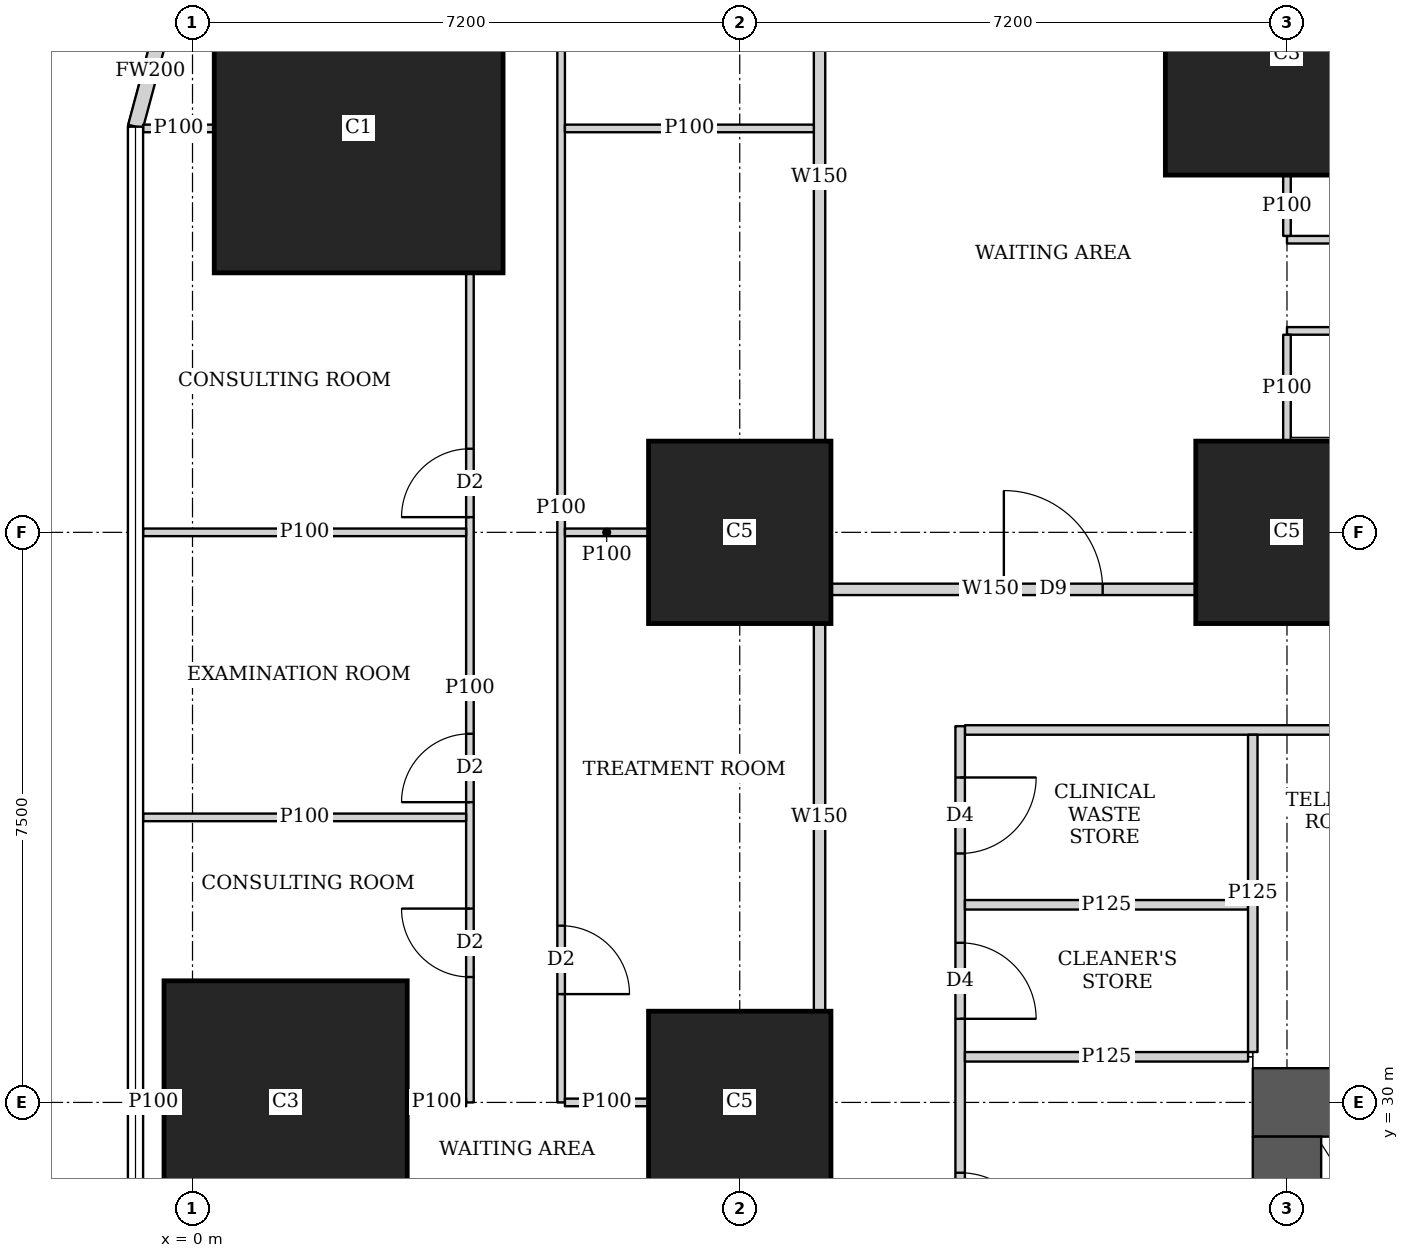
"""IFC4 building model, lengths in metres.
Left out: names, types, materials, properties, quantities, classifications, styles, units other than length and angle.
Written with IfcOpenShell. Run it as: python <this file> out.ifc"""

import sys

from ifc_helpers import new_model, si_unit, direction, frame, frame_2d, origin, origin_2d, place, context, subcontext, project, spatial, rectangle, extrude, element, fill, save


model = new_model("IFC4")
c1 = context("Model", 3, precision=1e-05, world=origin(), true_north=direction((0.0, 1.0)))
c2 = subcontext(c1, "Body", "Model", "MODEL_VIEW")
j1 = project(units=[si_unit("LENGTHUNIT", "METRE"), si_unit("PLANEANGLEUNIT", "RADIAN")], contexts=[c1])
p1 = place(None, origin())
s1 = spatial("IfcSite", under=j1, at=p1, CompositionType="ELEMENT")
p2 = place(p1, origin())
s2 = spatial("IfcBuilding", under=s1, at=p2, CompositionType="ELEMENT")
p3 = place(p2, frame((0.0, 0.0, 5.6)))
s3 = spatial("IfcBuildingStorey", under=s2, at=p3, CompositionType="ELEMENT", Elevation=5.6)
p4 = place(p3, frame((1.225, 30.0, 0.0), z_axis=(0.0, 0.0, 1.0), x_axis=(1.0, 0.0, 0.0)))
e1 = element("IfcColumn", 1, at=p4, inside=s3, PredefinedType="COLUMN", context=c2, shape_type="SweptSolid", body=[
    extrude(rectangle(XDim=3.2, YDim=3.2, at=origin_2d()), origin(), (0.0, 0.0, 1.0), 4.5),
])
for number, where, z_axis, x_axis in (
    (2, (7.2, 30.0, 0.0), (0.0, 0.0, 1.0), (1.0, 0.0, 0.0)),
    (3, (7.2, 37.5, 0.0), (0.0, 0.0, 1.0), (1.0, 0.0, 0.0)),
    (4, (14.4, 37.5, 0.0), (0.0, 0.0, 1.0), (1.0, 0.0, 0.0)),
):
    element("IfcColumn", number, at=place(p3, frame(where, z_axis=z_axis, x_axis=x_axis)), inside=s3, PredefinedType="COLUMN", context=c2, shape_type="SweptSolid", body=[
        extrude(rectangle(XDim=2.4, YDim=2.4, at=origin_2d()), origin(), (0.0, 0.0, 1.0), 4.5),
    ])
p5 = place(p3, frame((2.186, 42.814, 0.0), z_axis=(0.0, 0.0, 1.0), x_axis=(1.0, 0.0, 0.0)))
e5 = element("IfcColumn", 5, at=p5, inside=s3, PredefinedType="COLUMN", context=c2, shape_type="SweptSolid", body=[
    extrude(rectangle(XDim=3.8, YDim=3.8, at=origin_2d()), origin(), (0.0, 0.0, 1.0), 4.5),
])
p6 = place(p3, frame((14.4, 43.8, 0.0), z_axis=(0.0, 0.0, 1.0), x_axis=(1.0, 0.0, 0.0)))
e6 = element("IfcColumn", 6, at=p6, inside=s3, PredefinedType="COLUMN", context=c2, shape_type="SweptSolid", body=[
    extrude(rectangle(XDim=3.2, YDim=3.2, at=origin_2d()), origin(), (0.0, 0.0, 1.0), 4.5),
])
p7 = place(p3, frame((13.95, 30.0, 0.0), z_axis=(0.0, 0.0, 1.0), x_axis=(1.0, 0.0, 0.0)))
e7 = element("IfcWall", 7, at=p7, inside=s3, PredefinedType="SHEAR", context=c2, shape_type="SweptSolid", body=[
    extrude(rectangle(XDim=15.3, YDim=0.9, at=frame_2d((7.65, 0.0))), origin(), (0.0, 0.0, 1.0), 4.5),
])
p8 = place(p7, frame((4.45, 0.0, 0.0)))
e8 = element("IfcOpeningElement", 8, at=p8, cuts=e7, PredefinedType="OPENING", context=c2, shape_type="SweptSolid", body=[
    extrude(rectangle(XDim=1.8, YDim=2.1, at=frame_2d((0.9, 1.05))), frame((0.0, 0.46, 0.0), z_axis=(0.0, -1.0, 0.0), x_axis=(1.0, 0.0, 0.0)), (0.0, 0.0, 1.0), 0.92),
])
p9 = place(p7, frame((10.7, 0.0, 0.0)))
e9 = element("IfcOpeningElement", 9, at=p9, cuts=e7, PredefinedType="OPENING", context=c2, shape_type="SweptSolid", body=[
    extrude(rectangle(XDim=1.1, YDim=2.1, at=frame_2d((0.55, 1.05))), frame((0.0, 0.46, 0.0), z_axis=(0.0, -1.0, 0.0), x_axis=(1.0, 0.0, 0.0)), (0.0, 0.0, 1.0), 0.92),
])
p10 = place(p3, frame((14.4, 15.45, 0.0), z_axis=(0.0, 0.0, 1.0), x_axis=(0.0, 1.0, 0.0)))
e10 = element("IfcWall", 10, at=p10, inside=s3, PredefinedType="SHEAR", context=c2, shape_type="SweptSolid", body=[
    extrude(rectangle(XDim=14.1, YDim=0.9, at=frame_2d((7.05, 0.0))), origin(), (0.0, 0.0, 1.0), 4.5),
])
p11 = place(p3, frame((-0.358, 44.298, 0.0), z_axis=(0.0, 0.0, 1.0), x_axis=(-0.259168954497, -0.965832000415, 0.0)))
e11 = element("IfcWall", 11, at=p11, inside=s3, PredefinedType="SOLIDWALL", context=c2, shape_type="SweptSolid", body=[
    extrude(rectangle(XDim=1.513, YDim=0.2, at=frame_2d((0.756, 0.0))), origin(), (0.0, 0.0, 1.0), 4.2),
])
p12 = place(p3, frame((8.25, 31.201, 0.0), z_axis=(0.0, 0.0, 1.0), x_axis=(0.0, 1.0, 0.0)))
e12 = element("IfcWall", 12, at=p12, inside=s3, PredefinedType="SOLIDWALL", context=c2, shape_type="SweptSolid", body=[
    extrude(rectangle(XDim=5.098, YDim=0.15, at=frame_2d((2.549, 0.0))), origin(), (0.0, 0.0, 1.0), 4.2),
])
p13 = place(p3, frame((8.25, 38.701, 0.0), z_axis=(0.0, 0.0, 1.0), x_axis=(0.0, 1.0, 0.0)))
e13 = element("IfcWall", 13, at=p13, inside=s3, PredefinedType="SOLIDWALL", context=c2, shape_type="SweptSolid", body=[
    extrude(rectangle(XDim=6.949, YDim=0.15, at=frame_2d((3.475, 0.0))), origin(), (0.0, 0.0, 1.0), 2.4),
])
p14 = place(p3, frame((8.401, 36.75, 0.0), z_axis=(0.0, 0.0, 1.0), x_axis=(1.0, 0.0, 0.0)))
e14 = element("IfcWall", 14, at=p14, inside=s3, PredefinedType="SOLIDWALL", context=c2, shape_type="SweptSolid", body=[
    extrude(rectangle(XDim=4.798, YDim=0.15, at=frame_2d((2.399, 0.0))), origin(), (0.0, 0.0, 1.0), 2.6),
])
p15 = place(p14, frame((2.274, 0.0, 0.0)))
e15 = element("IfcOpeningElement", 15, at=p15, cuts=e14, PredefinedType="OPENING", context=c2, shape_type="SweptSolid", body=[
    extrude(rectangle(XDim=1.3, YDim=2.1, at=frame_2d((0.65, 1.05))), frame((0.0, 0.085, 0.0), z_axis=(0.0, -1.0, 0.0), x_axis=(1.0, 0.0, 0.0)), (0.0, 0.0, 1.0), 0.17),
])
p16 = place(p3, frame((3.65, 30.0, 0.0), z_axis=(0.0, 0.0, 1.0), x_axis=(0.0, 1.0, 0.0)))
e16 = element("IfcWall", 16, at=p16, inside=s3, PredefinedType="PARTITIONING", context=c2, shape_type="SweptSolid", body=[
    extrude(rectangle(XDim=10.913, YDim=0.1, at=frame_2d((5.457, 0.0))), origin(), (0.0, 0.0, 1.0), 2.6),
])
p17 = place(p16, frame((1.65, 0.0, 0.0)))
e17 = element("IfcOpeningElement", 17, at=p17, cuts=e16, PredefinedType="OPENING", context=c2, shape_type="SweptSolid", body=[
    extrude(rectangle(XDim=0.9, YDim=2.1, at=frame_2d((0.45, 1.05))), frame((0.0, 0.06, 0.0), z_axis=(0.0, -1.0, 0.0), x_axis=(1.0, 0.0, 0.0)), (0.0, 0.0, 1.0), 0.12),
])
p18 = place(p16, frame((3.95, 0.0, 0.0)))
e18 = element("IfcOpeningElement", 18, at=p18, cuts=e16, PredefinedType="OPENING", context=c2, shape_type="SweptSolid", body=[
    extrude(rectangle(XDim=0.9, YDim=2.1, at=frame_2d((0.45, 1.05))), frame((0.0, 0.06, 0.0), z_axis=(0.0, -1.0, 0.0), x_axis=(1.0, 0.0, 0.0)), (0.0, 0.0, 1.0), 0.12),
])
p19 = place(p16, frame((7.7, 0.0, 0.0)))
e19 = element("IfcOpeningElement", 19, at=p19, cuts=e16, PredefinedType="OPENING", context=c2, shape_type="SweptSolid", body=[
    extrude(rectangle(XDim=0.9, YDim=2.1, at=frame_2d((0.45, 1.05))), frame((0.0, 0.06, 0.0), z_axis=(0.0, -1.0, 0.0), x_axis=(1.0, 0.0, 0.0)), (0.0, 0.0, 1.0), 0.12),
])
p20 = place(p3, frame((4.85, 30.0, 0.0), z_axis=(0.0, 0.0, 1.0), x_axis=(0.0, 1.0, 0.0)))
e20 = element("IfcWall", 20, at=p20, inside=s3, PredefinedType="PARTITIONING", context=c2, shape_type="SweptSolid", body=[
    extrude(rectangle(XDim=15.65, YDim=0.1, at=frame_2d((7.825, 0.0))), origin(), (0.0, 0.0, 1.0), 2.4),
])
p21 = place(p20, frame((1.425, 0.0, 0.0)))
e21 = element("IfcOpeningElement", 21, at=p21, cuts=e20, PredefinedType="OPENING", context=c2, shape_type="SweptSolid", body=[
    extrude(rectangle(XDim=0.9, YDim=2.1, at=frame_2d((0.45, 1.05))), frame((0.0, 0.06, 0.0), z_axis=(0.0, -1.0, 0.0), x_axis=(1.0, 0.0, 0.0)), (0.0, 0.0, 1.0), 0.12),
])
p22 = place(p3, frame((-0.65, 30.0, 0.0), z_axis=(0.0, 0.0, 1.0), x_axis=(1.0, 0.0, 0.0)))
e22 = element("IfcWall", 22, at=p22, inside=s3, PredefinedType="PARTITIONING", context=c2, shape_type="SweptSolid", body=[
    extrude(rectangle(XDim=0.274, YDim=0.1, at=frame_2d((0.137, 0.0))), origin(), (0.0, 0.0, 1.0), 4.2),
])
p23 = place(p3, frame((2.826, 30.0, 0.0), z_axis=(0.0, 0.0, 1.0), x_axis=(1.0, 0.0, 0.0)))
e23 = element("IfcWall", 23, at=p23, inside=s3, PredefinedType="PARTITIONING", context=c2, shape_type="SweptSolid", body=[
    extrude(rectangle(XDim=0.774, YDim=0.1, at=frame_2d((0.387, 0.0))), origin(), (0.0, 0.0, 1.0), 2.6),
])
for number, where, z_axis, x_axis in (
    (24, (-0.65, 33.75, 0.0), (0.0, 0.0, 1.0), (1.0, 0.0, 0.0)),
    (25, (-0.65, 37.5, 0.0), (0.0, 0.0, 1.0), (1.0, 0.0, 0.0)),
):
    element("IfcWall", number, at=place(p3, frame(where, z_axis=z_axis, x_axis=x_axis)), inside=s3, PredefinedType="PARTITIONING", context=c2, shape_type="SweptSolid", body=[
        extrude(rectangle(XDim=4.25, YDim=0.1, at=frame_2d((2.125, 0.0))), origin(), (0.0, 0.0, 1.0), 2.4),
    ])
p24 = place(p3, frame((-0.65, 42.814, 0.0), z_axis=(0.0, 0.0, 1.0), x_axis=(1.0, 0.0, 0.0)))
e26 = element("IfcWall", 26, at=p24, inside=s3, PredefinedType="PARTITIONING", context=c2, shape_type="SweptSolid", body=[
    extrude(rectangle(XDim=0.935, YDim=0.1, at=frame_2d((0.467, 0.0))), origin(), (0.0, 0.0, 1.0), 4.2),
])
p25 = place(p3, frame((4.9, 30.0, 0.0), z_axis=(0.0, 0.0, 1.0), x_axis=(1.0, 0.0, 0.0)))
e27 = element("IfcWall", 27, at=p25, inside=s3, PredefinedType="PARTITIONING", context=c2, shape_type="SweptSolid", body=[
    extrude(rectangle(XDim=1.099, YDim=0.1, at=frame_2d((0.55, 0.0))), origin(), (0.0, 0.0, 1.0), 2.6),
])
p26 = place(p3, frame((4.9, 37.5, 0.0), z_axis=(0.0, 0.0, 1.0), x_axis=(1.0, 0.0, 0.0)))
e28 = element("IfcWall", 28, at=p26, inside=s3, PredefinedType="PARTITIONING", context=c2, shape_type="SweptSolid", body=[
    extrude(rectangle(XDim=1.099, YDim=0.1, at=frame_2d((0.55, 0.0))), origin(), (0.0, 0.0, 1.0), 4.2),
])
p27 = place(p3, frame((4.9, 42.814, 0.0), z_axis=(0.0, 0.0, 1.0), x_axis=(1.0, 0.0, 0.0)))
e29 = element("IfcWall", 29, at=p27, inside=s3, PredefinedType="PARTITIONING", context=c2, shape_type="SweptSolid", body=[
    extrude(rectangle(XDim=3.275, YDim=0.1, at=frame_2d((1.638, 0.0))), origin(), (0.0, 0.0, 1.0), 2.4),
])
p28 = place(p3, frame((14.4, 41.35, 0.0), z_axis=(0.0, 0.0, 1.0), x_axis=(1.0, 0.0, 0.0)))
e30 = element("IfcWall", 30, at=p28, inside=s3, PredefinedType="PARTITIONING", context=c2, shape_type="SweptSolid", body=[
    extrude(rectangle(XDim=3.475, YDim=0.1, at=frame_2d((1.738, 0.0))), origin(), (0.0, 0.0, 1.0), 2.6),
])
p29 = place(p28, frame((1.65, 0.0, 0.0)))
e31 = element("IfcOpeningElement", 31, at=p29, cuts=e30, PredefinedType="OPENING", context=c2, shape_type="SweptSolid", body=[
    extrude(rectangle(XDim=0.9, YDim=2.1, at=frame_2d((0.45, 1.05))), frame((0.0, 0.06, 0.0), z_axis=(0.0, -1.0, 0.0), x_axis=(1.0, 0.0, 0.0)), (0.0, 0.0, 1.0), 0.12),
])
p30 = place(p3, frame((14.4, 40.15, 0.0), z_axis=(0.0, 0.0, 1.0), x_axis=(1.0, 0.0, 0.0)))
e32 = element("IfcWall", 32, at=p30, inside=s3, PredefinedType="PARTITIONING", context=c2, shape_type="SweptSolid", body=[
    extrude(rectangle(XDim=3.475, YDim=0.1, at=frame_2d((1.738, 0.0))), origin(), (0.0, 0.0, 1.0), 2.6),
])
p31 = place(p30, frame((1.35, 0.0, 0.0)))
e33 = element("IfcOpeningElement", 33, at=p31, cuts=e32, PredefinedType="OPENING", context=c2, shape_type="SweptSolid", body=[
    extrude(rectangle(XDim=0.9, YDim=2.1, at=frame_2d((0.45, 1.05))), frame((0.0, 0.06, 0.0), z_axis=(0.0, -1.0, 0.0), x_axis=(1.0, 0.0, 0.0)), (0.0, 0.0, 1.0), 0.12),
])
p32 = place(p3, frame((14.4, 41.4, 0.0), z_axis=(0.0, 0.0, 1.0), x_axis=(0.0, 1.0, 0.0)))
e34 = element("IfcWall", 34, at=p32, inside=s3, PredefinedType="PARTITIONING", context=c2, shape_type="SweptSolid", body=[
    extrude(rectangle(XDim=0.799, YDim=0.1, at=frame_2d((0.399, 0.0))), origin(), (0.0, 0.0, 1.0), 2.6),
])
p33 = place(p3, frame((14.4, 38.701, 0.0), z_axis=(0.0, 0.0, 1.0), x_axis=(0.0, 1.0, 0.0)))
e35 = element("IfcWall", 35, at=p33, inside=s3, PredefinedType="PARTITIONING", context=c2, shape_type="SweptSolid", body=[
    extrude(rectangle(XDim=1.399, YDim=0.1, at=frame_2d((0.7, 0.0))), origin(), (0.0, 0.0, 1.0), 2.6),
])
p34 = place(p3, frame((10.1, 10.05, 0.0), z_axis=(0.0, 0.0, 1.0), x_axis=(0.0, 1.0, 0.0)))
e36 = element("IfcWall", 36, at=p34, inside=s3, PredefinedType="PARTITIONING", context=c2, shape_type="SweptSolid", body=[
    extrude(rectangle(XDim=24.9, YDim=0.125, at=frame_2d((12.45, 0.0))), origin(), (0.0, 0.0, 1.0), 2.6),
])
p35 = place(p34, frame((1.675, 0.0, 0.0)))
e37 = element("IfcOpeningElement", 37, at=p35, cuts=e36, PredefinedType="OPENING", context=c2, shape_type="SweptSolid", body=[
    extrude(rectangle(XDim=1.0, YDim=2.1, at=frame_2d((0.5, 1.05))), frame((0.0, 0.073, 0.0), z_axis=(0.0, -1.0, 0.0), x_axis=(1.0, 0.0, 0.0)), (0.0, 0.0, 1.0), 0.145),
])
p36 = place(p34, frame((5.85, 0.0, 0.0)))
e38 = element("IfcOpeningElement", 38, at=p36, cuts=e36, PredefinedType="OPENING", context=c2, shape_type="SweptSolid", body=[
    extrude(rectangle(XDim=1.0, YDim=2.1, at=frame_2d((0.5, 1.05))), frame((0.0, 0.073, 0.0), z_axis=(0.0, -1.0, 0.0), x_axis=(1.0, 0.0, 0.0)), (0.0, 0.0, 1.0), 0.145),
])
p37 = place(p34, frame((8.975, 0.0, 0.0)))
e39 = element("IfcOpeningElement", 39, at=p37, cuts=e36, PredefinedType="OPENING", context=c2, shape_type="SweptSolid", body=[
    extrude(rectangle(XDim=1.0, YDim=2.1, at=frame_2d((0.5, 1.05))), frame((0.0, 0.073, 0.0), z_axis=(0.0, -1.0, 0.0), x_axis=(1.0, 0.0, 0.0)), (0.0, 0.0, 1.0), 0.145),
])
p38 = place(p34, frame((11.025, 0.0, 0.0)))
e40 = element("IfcOpeningElement", 40, at=p38, cuts=e36, PredefinedType="OPENING", context=c2, shape_type="SweptSolid", body=[
    extrude(rectangle(XDim=1.0, YDim=2.1, at=frame_2d((0.5, 1.05))), frame((0.0, 0.073, 0.0), z_axis=(0.0, -1.0, 0.0), x_axis=(1.0, 0.0, 0.0)), (0.0, 0.0, 1.0), 0.145),
])
p39 = place(p34, frame((13.975, 0.0, 0.0)))
e41 = element("IfcOpeningElement", 41, at=p39, cuts=e36, PredefinedType="OPENING", context=c2, shape_type="SweptSolid", body=[
    extrude(rectangle(XDim=1.0, YDim=2.1, at=frame_2d((0.5, 1.05))), frame((0.0, 0.073, 0.0), z_axis=(0.0, -1.0, 0.0), x_axis=(1.0, 0.0, 0.0)), (0.0, 0.0, 1.0), 0.145),
])
p40 = place(p34, frame((18.025, 0.0, 0.0)))
e42 = element("IfcOpeningElement", 42, at=p40, cuts=e36, PredefinedType="OPENING", context=c2, shape_type="SweptSolid", body=[
    extrude(rectangle(XDim=1.0, YDim=2.1, at=frame_2d((0.5, 1.05))), frame((0.0, 0.073, 0.0), z_axis=(0.0, -1.0, 0.0), x_axis=(1.0, 0.0, 0.0)), (0.0, 0.0, 1.0), 0.145),
])
p41 = place(p34, frame((21.05, 0.0, 0.0)))
e43 = element("IfcOpeningElement", 43, at=p41, cuts=e36, PredefinedType="OPENING", context=c2, shape_type="SweptSolid", body=[
    extrude(rectangle(XDim=1.0, YDim=2.1, at=frame_2d((0.5, 1.05))), frame((0.0, 0.073, 0.0), z_axis=(0.0, -1.0, 0.0), x_axis=(1.0, 0.0, 0.0)), (0.0, 0.0, 1.0), 0.145),
])
p42 = place(p34, frame((23.225, 0.0, 0.0)))
e44 = element("IfcOpeningElement", 44, at=p42, cuts=e36, PredefinedType="OPENING", context=c2, shape_type="SweptSolid", body=[
    extrude(rectangle(XDim=1.0, YDim=2.1, at=frame_2d((0.5, 1.05))), frame((0.0, 0.073, 0.0), z_axis=(0.0, -1.0, 0.0), x_axis=(1.0, 0.0, 0.0)), (0.0, 0.0, 1.0), 0.145),
])
p43 = place(p3, frame((10.163, 30.6, 0.0), z_axis=(0.0, 0.0, 1.0), x_axis=(1.0, 0.0, 0.0)))
e45 = element("IfcWall", 45, at=p43, inside=s3, PredefinedType="PARTITIONING", context=c2, shape_type="SweptSolid", body=[
    extrude(rectangle(XDim=3.725, YDim=0.125, at=frame_2d((1.862, 0.0))), origin(), (0.0, 0.0, 1.0), 2.6),
])
p44 = place(p3, frame((13.95, 30.663, 0.0), z_axis=(0.0, 0.0, 1.0), x_axis=(0.0, 1.0, 0.0)))
e46 = element("IfcWall", 46, at=p44, inside=s3, PredefinedType="PARTITIONING", context=c2, shape_type="SweptSolid", body=[
    extrude(rectangle(XDim=4.174, YDim=0.125, at=frame_2d((2.087, 0.0))), origin(), (0.0, 0.0, 1.0), 2.6),
])
p45 = place(p3, frame((10.163, 34.9, 0.0), z_axis=(0.0, 0.0, 1.0), x_axis=(1.0, 0.0, 0.0)))
e47 = element("IfcWall", 47, at=p45, inside=s3, PredefinedType="PARTITIONING", context=c2, shape_type="SweptSolid", body=[
    extrude(rectangle(XDim=11.287, YDim=0.125, at=frame_2d((5.644, 0.0))), origin(), (0.0, 0.0, 1.0), 2.2),
])
p46 = place(p45, frame((7.737, 0.0, 0.0)))
e48 = element("IfcOpeningElement", 48, at=p46, cuts=e47, PredefinedType="OPENING", context=c2, shape_type="SweptSolid", body=[
    extrude(rectangle(XDim=1.8, YDim=2.1, at=frame_2d((0.9, 1.05))), frame((0.0, 0.073, 0.0), z_axis=(0.0, -1.0, 0.0), x_axis=(1.0, 0.0, 0.0)), (0.0, 0.0, 1.0), 0.145),
])
p47 = place(p3, frame((10.163, 32.6, 0.0), z_axis=(0.0, 0.0, 1.0), x_axis=(1.0, 0.0, 0.0)))
e49 = element("IfcWall", 49, at=p47, inside=s3, PredefinedType="PARTITIONING", context=c2, shape_type="SweptSolid", body=[
    extrude(rectangle(XDim=3.725, YDim=0.125, at=frame_2d((1.862, 0.0))), origin(), (0.0, 0.0, 1.0), 2.6),
])
p48 = place(p17, origin())
e50 = element("IfcDoor", 50, at=p48, inside=s3, OperationType="SINGLE_SWING_RIGHT", PredefinedType="DOOR", context=c2, shape_type="SweptSolid", body=[
    extrude(rectangle(XDim=0.9, YDim=2.1, at=frame_2d((0.45, 1.05))), frame((0.0, 0.025, 0.0), z_axis=(0.0, -1.0, 0.0), x_axis=(1.0, 0.0, 0.0)), (0.0, 0.0, 1.0), 0.05),
])
fill(e17, e50)
p49 = place(p18, origin())
e51 = element("IfcDoor", 51, at=p49, inside=s3, OperationType="SINGLE_SWING_LEFT", PredefinedType="DOOR", context=c2, shape_type="SweptSolid", body=[
    extrude(rectangle(XDim=0.9, YDim=2.1, at=frame_2d((0.45, 1.05))), frame((0.0, 0.025, 0.0), z_axis=(0.0, -1.0, 0.0), x_axis=(1.0, 0.0, 0.0)), (0.0, 0.0, 1.0), 0.05),
])
fill(e18, e51)
p50 = place(p19, origin())
e52 = element("IfcDoor", 52, at=p50, inside=s3, OperationType="SINGLE_SWING_LEFT", PredefinedType="DOOR", context=c2, shape_type="SweptSolid", body=[
    extrude(rectangle(XDim=0.9, YDim=2.1, at=frame_2d((0.45, 1.05))), frame((0.0, 0.025, 0.0), z_axis=(0.0, -1.0, 0.0), x_axis=(1.0, 0.0, 0.0)), (0.0, 0.0, 1.0), 0.05),
])
fill(e19, e52)
p51 = place(p21, origin())
e53 = element("IfcDoor", 53, at=p51, inside=s3, OperationType="SINGLE_SWING_RIGHT", PredefinedType="DOOR", context=c2, shape_type="SweptSolid", body=[
    extrude(rectangle(XDim=0.9, YDim=2.1, at=frame_2d((0.45, 1.05))), frame((0.0, 0.025, 0.0), z_axis=(0.0, -1.0, 0.0), x_axis=(1.0, 0.0, 0.0)), (0.0, 0.0, 1.0), 0.05),
])
fill(e21, e53)
p52 = place(p15, origin())
e54 = element("IfcDoor", 54, at=p52, inside=s3, OperationType="DOUBLE_DOOR_SINGLE_SWING", PredefinedType="DOOR", context=c2, shape_type="SweptSolid", body=[
    extrude(rectangle(XDim=1.3, YDim=2.1, at=frame_2d((0.65, 1.05))), frame((0.0, 0.025, 0.0), z_axis=(0.0, -1.0, 0.0), x_axis=(1.0, 0.0, 0.0)), (0.0, 0.0, 1.0), 0.05),
])
fill(e15, e54)
p53 = place(p40, origin())
e55 = element("IfcDoor", 55, at=p53, inside=s3, OperationType="SINGLE_SWING_RIGHT", PredefinedType="DOOR", context=c2, shape_type="SweptSolid", body=[
    extrude(rectangle(XDim=1.0, YDim=2.1, at=frame_2d((0.5, 1.05))), frame((0.0, 0.025, 0.0), z_axis=(0.0, -1.0, 0.0), x_axis=(1.0, 0.0, 0.0)), (0.0, 0.0, 1.0), 0.05),
])
fill(e42, e55)
p54 = place(p41, origin())
e56 = element("IfcDoor", 56, at=p54, inside=s3, OperationType="SINGLE_SWING_RIGHT", PredefinedType="DOOR", context=c2, shape_type="SweptSolid", body=[
    extrude(rectangle(XDim=1.0, YDim=2.1, at=frame_2d((0.5, 1.05))), frame((0.0, 0.025, 0.0), z_axis=(0.0, -1.0, 0.0), x_axis=(1.0, 0.0, 0.0)), (0.0, 0.0, 1.0), 0.05),
])
fill(e43, e56)
p55 = place(p42, origin())
e57 = element("IfcDoor", 57, at=p55, inside=s3, OperationType="SINGLE_SWING_LEFT", PredefinedType="DOOR", context=c2, shape_type="SweptSolid", body=[
    extrude(rectangle(XDim=1.0, YDim=2.1, at=frame_2d((0.5, 1.05))), frame((0.0, 0.025, 0.0), z_axis=(0.0, -1.0, 0.0), x_axis=(1.0, 0.0, 0.0)), (0.0, 0.0, 1.0), 0.05),
])
fill(e44, e57)
save(model, sys.argv[1])
